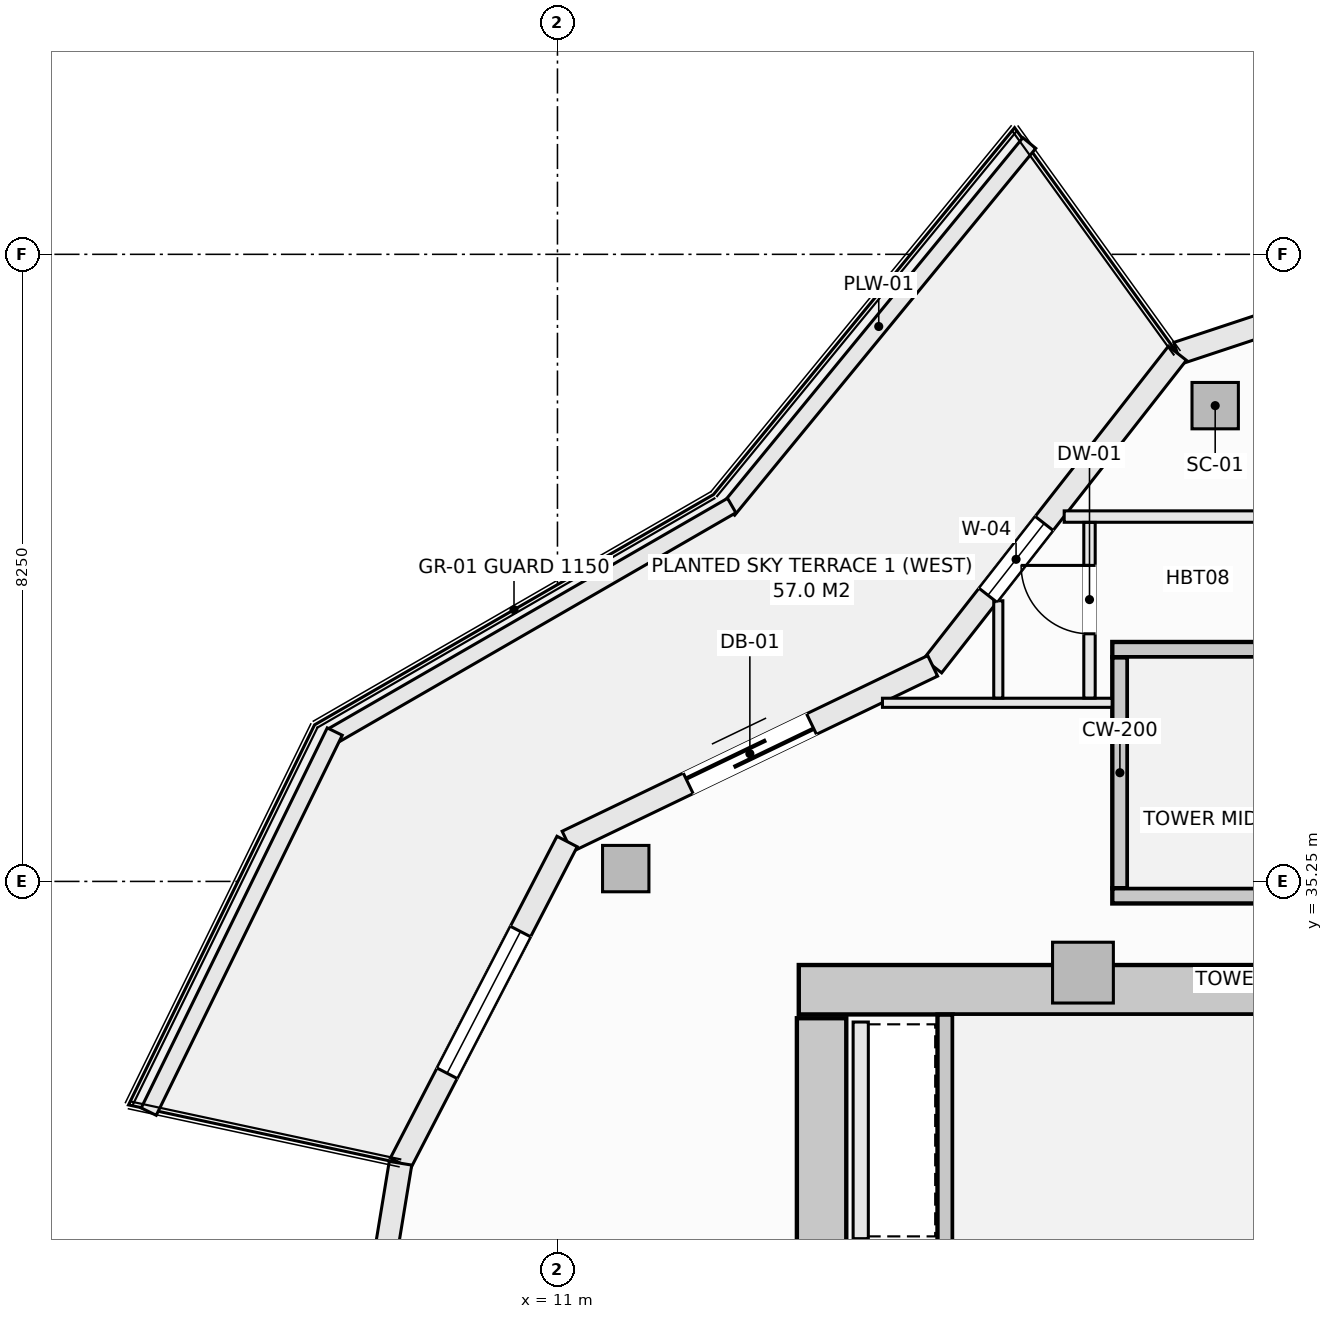
"""IFC4 building model, lengths in metres.
Left out: names, types, materials, properties, quantities, classifications, styles, units other than length and angle.
Written with IfcOpenShell. Run it as: python <this file> out.ifc"""

import sys

from ifc_helpers import new_model, si_unit, direction, frame, frame_2d, origin, origin_2d, place, context, subcontext, project, spatial, rectangle, hollow_rectangle, extrude, element, fill, save


model = new_model("IFC4")
c1 = context("Model", 3, precision=1e-05, world=origin(), true_north=direction((0.0, 1.0)))
c2 = subcontext(c1, "Body", "Model", "MODEL_VIEW")
j1 = project(units=[si_unit("LENGTHUNIT", "METRE"), si_unit("PLANEANGLEUNIT", "RADIAN")], contexts=[c1])
p1 = place(None, origin())
s1 = spatial("IfcSite", under=j1, at=p1, CompositionType="ELEMENT")
p2 = place(p1, origin())
s2 = spatial("IfcBuilding", under=s1, at=p2, CompositionType="ELEMENT")
p3 = place(p2, frame((0.0, 0.0, 180.1)))
s3 = spatial("IfcBuildingStorey", under=s2, at=p3, CompositionType="ELEMENT", Elevation=180.1)
p4 = place(p3, frame((14.175, 33.825, -0.27), z_axis=(0.0, 0.0, 1.0), x_axis=(1.0, 0.0, 0.0)))
e1 = element("IfcWall", 1, at=p4, inside=s3, PredefinedType="SHEAR", context=c2, shape_type="SweptSolid", body=[
    extrude(rectangle(XDim=13.65, YDim=0.65, at=frame_2d((6.825, 0.0))), origin(), (0.0, 0.0, 1.0), 3.4),
])
p5 = place(p3, frame((14.475, 20.55, -0.27), z_axis=(0.0, 0.0, 1.0), x_axis=(0.0, 1.0, 0.0)))
e2 = element("IfcWall", 2, at=p5, inside=s3, PredefinedType="SHEAR", context=c2, shape_type="SweptSolid", body=[
    extrude(rectangle(XDim=12.9, YDim=0.65, at=frame_2d((6.45, 0.0))), origin(), (0.0, 0.0, 1.0), 3.4),
])
for number, where, z_axis, x_axis in (
    (3, (19.654, 41.51, -0.27), (0.0, 0.0, 1.0), (1.0, 0.0, 0.0)),
    (4, (11.898, 35.419, -0.27), (0.0, 0.0, 1.0), (1.0, 0.0, 0.0)),
):
    element("IfcColumn", number, at=place(p3, frame(where, z_axis=z_axis, x_axis=x_axis)), inside=s3, PredefinedType="COLUMN", context=c2, shape_type="SweptSolid", body=[
        extrude(hollow_rectangle(XDim=0.61, YDim=0.61, WallThickness=0.025, at=origin_2d()), origin(), (0.0, 0.0, 1.0), 3.4),
    ])
p6 = place(p3, frame((17.914, 34.05, -0.27), z_axis=(0.0, 0.0, 1.0), x_axis=(1.0, 0.0, 0.0)))
e5 = element("IfcColumn", 5, at=p6, inside=s3, PredefinedType="PILASTER", context=c2, shape_type="SweptSolid", body=[
    extrude(rectangle(XDim=0.8, YDim=0.8, at=origin_2d()), origin(), (0.0, 0.0, 1.0), 3.4),
])
p7 = place(p3, frame((19.156, 42.199, 0.0), z_axis=(0.0, 0.0, 1.0), x_axis=(0.949246811547, 0.314532177636, 0.0)))
e6 = element("IfcWall", 6, at=p7, inside=s3, PredefinedType="SOLIDWALL", context=c2, shape_type="SweptSolid", body=[
    extrude(rectangle(XDim=5.574, YDim=0.3, at=frame_2d((2.787, 0.0))), origin(), (0.0, 0.0, 1.0), 2.653),
])
p8 = place(p7, frame((1.737, 0.0, 0.74)))
e7 = element("IfcOpeningElement", 7, at=p8, cuts=e6, PredefinedType="OPENING", context=c2, shape_type="SweptSolid", body=[
    extrude(rectangle(XDim=2.1, YDim=1.7, at=frame_2d((1.05, 0.85))), frame((0.0, 0.16, 0.0), z_axis=(0.0, -1.0, 0.0), x_axis=(1.0, 0.0, 0.0)), (0.0, 0.0, 1.0), 0.32),
])
p9 = place(p3, frame((15.937, 38.086, 0.0), z_axis=(0.0, 0.0, 1.0), x_axis=(0.616429245738, 0.787410302828, 0.0)))
e8 = element("IfcWall", 8, at=p9, inside=s3, PredefinedType="SOLIDWALL", context=c2, shape_type="SweptSolid", body=[
    extrude(rectangle(XDim=5.223, YDim=0.3, at=frame_2d((2.612, 0.0))), origin(), (0.0, 0.0, 1.0), 2.653),
])
p10 = place(p9, frame((1.18, 0.0, 0.72)))
e9 = element("IfcOpeningElement", 9, at=p10, cuts=e8, PredefinedType="OPENING", context=c2, shape_type="SweptSolid", body=[
    extrude(rectangle(XDim=1.2, YDim=1.65, at=frame_2d((0.6, 0.825))), frame((0.0, 0.16, 0.0), z_axis=(0.0, -1.0, 0.0), x_axis=(1.0, 0.0, 0.0)), (0.0, 0.0, 1.0), 0.32),
])
p11 = place(p3, frame((11.127, 35.775, 0.0), z_axis=(0.0, 0.0, 1.0), x_axis=(0.901353070301, 0.433085029363, 0.0)))
e10 = element("IfcWall", 10, at=p11, inside=s3, PredefinedType="SOLIDWALL", context=c2, shape_type="SweptSolid", body=[
    extrude(rectangle(XDim=5.336, YDim=0.3, at=frame_2d((2.668, 0.0))), origin(), (0.0, 0.0, 1.0), 2.653),
])
p12 = place(p11, frame((1.768, 0.0, 0.0)))
e11 = element("IfcOpeningElement", 11, at=p12, cuts=e10, PredefinedType="OPENING", context=c2, shape_type="SweptSolid", body=[
    extrude(rectangle(XDim=1.8, YDim=2.25, at=frame_2d((0.9, 1.125))), frame((0.0, 0.16, 0.0), z_axis=(0.0, -1.0, 0.0), x_axis=(1.0, 0.0, 0.0)), (0.0, 0.0, 1.0), 0.32),
])
p13 = place(p3, frame((8.935, 31.542, 0.0), z_axis=(0.0, 0.0, 1.0), x_axis=(0.459810251451, 0.888017191647, 0.0)))
e12 = element("IfcWall", 12, at=p13, inside=s3, PredefinedType="SOLIDWALL", context=c2, shape_type="SweptSolid", body=[
    extrude(rectangle(XDim=4.766, YDim=0.3, at=frame_2d((2.383, 0.0))), origin(), (0.0, 0.0, 1.0), 2.653),
])
p14 = place(p13, frame((1.333, 0.0, 0.74)))
e13 = element("IfcOpeningElement", 13, at=p14, cuts=e12, PredefinedType="OPENING", context=c2, shape_type="SweptSolid", body=[
    extrude(rectangle(XDim=2.1, YDim=1.7, at=frame_2d((1.05, 0.85))), frame((0.0, 0.16, 0.0), z_axis=(0.0, -1.0, 0.0), x_axis=(1.0, 0.0, 0.0)), (0.0, 0.0, 1.0), 0.32),
])
p15 = place(p3, frame((8.188, 27.0, 0.0), z_axis=(0.0, 0.0, 1.0), x_axis=(0.162394765401, 0.986725868806, 0.0)))
e14 = element("IfcWall", 14, at=p15, inside=s3, PredefinedType="SOLIDWALL", context=c2, shape_type="SweptSolid", body=[
    extrude(rectangle(XDim=4.603, YDim=0.3, at=frame_2d((2.302, 0.0))), origin(), (0.0, 0.0, 1.0), 2.653),
])
p16 = place(p15, frame((1.252, 0.0, 0.74)))
e15 = element("IfcOpeningElement", 15, at=p16, cuts=e14, PredefinedType="OPENING", context=c2, shape_type="SweptSolid", body=[
    extrude(rectangle(XDim=2.1, YDim=1.7, at=frame_2d((1.05, 0.85))), frame((0.0, 0.16, 0.0), z_axis=(0.0, -1.0, 0.0), x_axis=(1.0, 0.0, 0.0)), (0.0, 0.0, 1.0), 0.32),
])
p17 = place(p3, frame((13.246, 40.137, 0.0), z_axis=(0.0, 0.0, 1.0), x_axis=(0.634429234628, 0.77298094818, 0.0)))
e16 = element("IfcWall", 16, at=p17, inside=s3, PredefinedType="PARAPET", context=c2, shape_type="SweptSolid", body=[
    extrude(rectangle(XDim=6.245, YDim=0.22, at=frame_2d((3.123, 0.0))), origin(), (0.0, 0.0, 1.0), 0.52),
])
p18 = place(p3, frame((8.044, 37.166, 0.0), z_axis=(0.0, 0.0, 1.0), x_axis=(0.866058128659, 0.499943314571, 0.0)))
e17 = element("IfcWall", 17, at=p18, inside=s3, PredefinedType="PARAPET", context=c2, shape_type="SweptSolid", body=[
    extrude(rectangle(XDim=6.06, YDim=0.22, at=frame_2d((3.03, 0.0))), origin(), (0.0, 0.0, 1.0), 0.52),
])
p19 = place(p3, frame((5.622, 32.221, 0.0), z_axis=(0.0, 0.0, 1.0), x_axis=(0.439637174641, 0.898175458735, 0.0)))
e18 = element("IfcWall", 18, at=p19, inside=s3, PredefinedType="PARAPET", context=c2, shape_type="SweptSolid", body=[
    extrude(rectangle(XDim=5.567, YDim=0.22, at=frame_2d((2.784, 0.0))), origin(), (0.0, 0.0, 1.0), 0.52),
])
p20 = place(p3, frame((16.1, 30.462, -0.27), z_axis=(0.0, 0.0, 1.0), x_axis=(0.0, 1.0, 0.0)))
e19 = element("IfcWall", 19, at=p20, inside=s3, PredefinedType="SHEAR", context=c2, shape_type="SweptSolid", body=[
    extrude(rectangle(XDim=3.036, YDim=0.2, at=frame_2d((1.518, 0.0))), origin(), (0.0, 0.0, 1.0), 3.4),
])
p21 = place(p3, frame((18.4, 35.16, -0.27), z_axis=(0.0, 0.0, 1.0), x_axis=(0.0, 1.0, 0.0)))
e20 = element("IfcWall", 20, at=p21, inside=s3, PredefinedType="SHEAR", context=c2, shape_type="SweptSolid", body=[
    extrude(rectangle(XDim=3.04, YDim=0.2, at=frame_2d((1.52, 0.0))), origin(), (0.0, 0.0, 1.0), 3.4),
])
for number, where, z_axis, x_axis in (
    (21, (18.3, 38.3, -0.27), (0.0, 0.0, 1.0), (1.0, 0.0, 0.0)),
    (22, (18.3, 35.06, -0.27), (0.0, 0.0, 1.0), (1.0, 0.0, 0.0)),
):
    element("IfcWall", number, at=place(p3, frame(where, z_axis=z_axis, x_axis=x_axis)), inside=s3, PredefinedType="SHEAR", context=c2, shape_type="SweptSolid", body=[
        extrude(rectangle(XDim=8.95, YDim=0.2, at=frame_2d((4.475, 0.0))), origin(), (0.0, 0.0, 1.0), 3.4),
    ])
p22 = place(p3, frame((14.99, 30.55, 0.0), z_axis=(0.0, 0.0, 1.0), x_axis=(0.0, 1.0, 0.0)))
e23 = element("IfcWall", 23, at=p22, inside=s3, PredefinedType="SOLIDWALL", context=c2, shape_type="SweptSolid", body=[
    extrude(rectangle(XDim=2.85, YDim=0.2, at=frame_2d((1.425, 0.0))), origin(), (0.0, 0.0, 1.0), 3.13),
])
p23 = place(p3, frame((15.276, 37.6, 0.0), z_axis=(0.0, 0.0, 1.0), x_axis=(1.0, 0.0, 0.0)))
e24 = element("IfcWall", 24, at=p23, inside=s3, PredefinedType="PARTITIONING", context=c2, shape_type="SweptSolid", body=[
    extrude(rectangle(XDim=3.022, YDim=0.12, at=frame_2d((1.511, 0.0))), origin(), (0.0, 0.0, 1.0), 3.13),
])
p24 = place(p3, frame((17.667, 40.05, 0.0), z_axis=(0.0, 0.0, 1.0), x_axis=(1.0, 0.0, 0.0)))
e25 = element("IfcWall", 25, at=p24, inside=s3, PredefinedType="PARTITIONING", context=c2, shape_type="SweptSolid", body=[
    extrude(rectangle(XDim=3.183, YDim=0.15, at=frame_2d((1.592, 0.0))), origin(), (0.0, 0.0, 1.0), 2.653),
])
p25 = place(p3, frame((18.0, 37.662, 0.0), z_axis=(0.0, 0.0, 1.0), x_axis=(0.0, 1.0, 0.0)))
e26 = element("IfcWall", 26, at=p25, inside=s3, PredefinedType="PARTITIONING", context=c2, shape_type="SweptSolid", body=[
    extrude(rectangle(XDim=2.311, YDim=0.15, at=frame_2d((1.155, 0.0))), origin(), (0.0, 0.0, 1.0), 3.13),
])
p26 = place(p25, frame((0.845, 0.0, 0.0)))
e27 = element("IfcOpeningElement", 27, at=p26, cuts=e26, PredefinedType="OPENING", context=c2, shape_type="SweptSolid", body=[
    extrude(rectangle(XDim=0.9, YDim=2.1, at=frame_2d((0.45, 1.05))), frame((0.0, 0.085, 0.0), z_axis=(0.0, -1.0, 0.0), x_axis=(1.0, 0.0, 0.0)), (0.0, 0.0, 1.0), 0.17),
])
p27 = place(p3, frame((16.8, 37.662, 0.0), z_axis=(0.0, 0.0, 1.0), x_axis=(0.0, 1.0, 0.0)))
e28 = element("IfcWall", 28, at=p27, inside=s3, PredefinedType="PARTITIONING", context=c2, shape_type="SweptSolid", body=[
    extrude(rectangle(XDim=1.28, YDim=0.12, at=frame_2d((0.64, 0.0))), origin(), (0.0, 0.0, 1.0), 3.13),
])
p28 = place(p10, origin())
e29 = element("IfcWindow", 29, at=p28, inside=s3, PartitioningType="SINGLE_PANEL", PredefinedType="WINDOW", context=c2, shape_type="SweptSolid", body=[
    extrude(rectangle(XDim=1.2, YDim=1.65, at=frame_2d((0.6, 0.825))), frame((0.0, 0.03, 0.0), z_axis=(0.0, -1.0, 0.0), x_axis=(1.0, 0.0, 0.0)), (0.0, 0.0, 1.0), 0.06),
])
fill(e9, e29)
p29 = place(p12, origin())
e30 = element("IfcDoor", 30, at=p29, inside=s3, OperationType="SLIDING_TO_LEFT", PredefinedType="DOOR", context=c2, shape_type="SweptSolid", body=[
    extrude(rectangle(XDim=1.8, YDim=2.25, at=frame_2d((0.9, 1.125))), frame((0.0, 0.025, 0.0), z_axis=(0.0, -1.0, 0.0), x_axis=(1.0, 0.0, 0.0)), (0.0, 0.0, 1.0), 0.05),
])
fill(e11, e30)
p30 = place(p14, origin())
e31 = element("IfcWindow", 31, at=p30, inside=s3, PartitioningType="SINGLE_PANEL", PredefinedType="WINDOW", context=c2, shape_type="SweptSolid", body=[
    extrude(rectangle(XDim=2.1, YDim=1.7, at=frame_2d((1.05, 0.85))), frame((0.0, 0.03, 0.0), z_axis=(0.0, -1.0, 0.0), x_axis=(1.0, 0.0, 0.0)), (0.0, 0.0, 1.0), 0.06),
])
fill(e13, e31)
p31 = place(p26, origin())
e32 = element("IfcDoor", 32, at=p31, inside=s3, OperationType="SINGLE_SWING_RIGHT", PredefinedType="DOOR", context=c2, shape_type="SweptSolid", body=[
    extrude(rectangle(XDim=0.9, YDim=2.1, at=frame_2d((0.45, 1.05))), frame((0.0, 0.025, 0.0), z_axis=(0.0, -1.0, 0.0), x_axis=(1.0, 0.0, 0.0)), (0.0, 0.0, 1.0), 0.05),
])
fill(e27, e32)
save(model, sys.argv[1])
